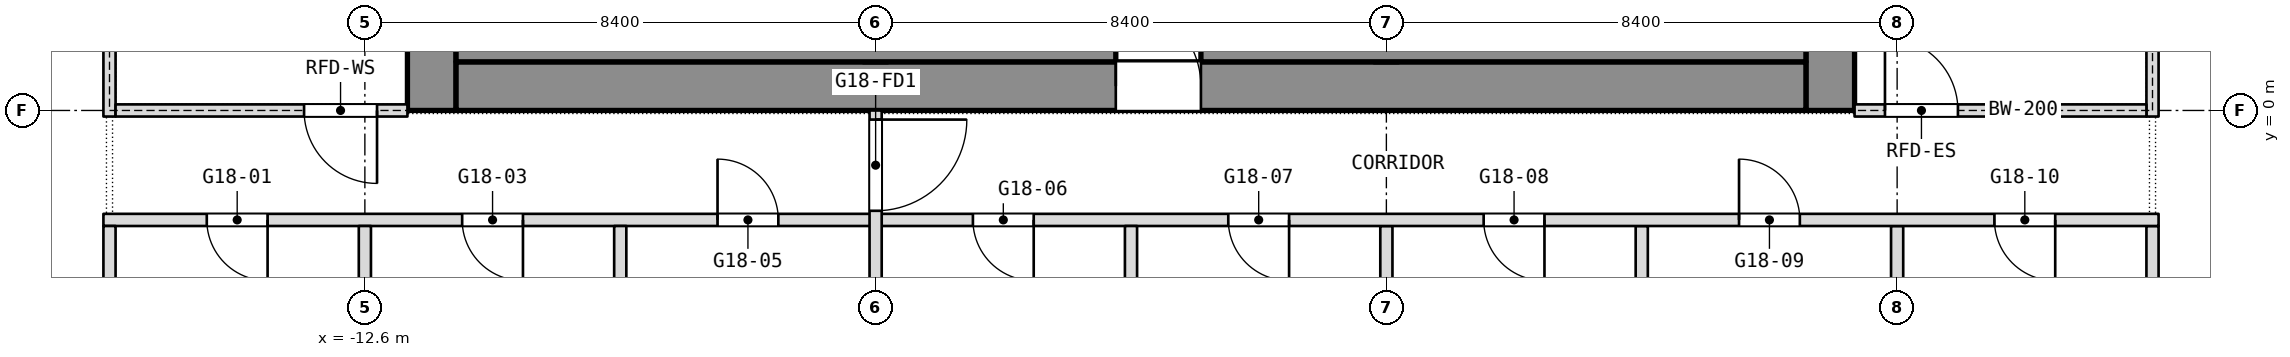
"""IFC4 building model, lengths in metres.
Left out: names, types, materials, properties, quantities, classifications, styles, units other than length and angle.
Written with IfcOpenShell. Run it as: python <this file> out.ifc"""

import sys

from ifc_helpers import new_model, si_unit, direction, frame, frame_2d, origin, place, context, subcontext, project, spatial, rectangle, extrude, element, fill, save


model = new_model("IFC4")
c1 = context("Model", 3, precision=1e-05, world=origin(), true_north=direction((0.0, 1.0)))
c2 = subcontext(c1, "Body", "Model", "MODEL_VIEW")
j1 = project(units=[si_unit("LENGTHUNIT", "METRE"), si_unit("PLANEANGLEUNIT", "RADIAN")], contexts=[c1])
p1 = place(None, origin())
s1 = spatial("IfcSite", under=j1, at=p1, CompositionType="ELEMENT")
p2 = place(p1, origin())
s2 = spatial("IfcBuilding", under=s1, at=p2, CompositionType="ELEMENT")
p3 = place(p2, frame((0.0, 0.0, 216.5)))
s3 = spatial("IfcBuildingStorey", under=s2, at=p3, CompositionType="ELEMENT", Elevation=216.5)
p4 = place(p3, frame((11.5, 0.0, 0.0), z_axis=(0.0, 0.0, 1.0), x_axis=(0.0, 1.0, 0.0)))
e1 = element("IfcWall", 1, at=p4, inside=s3, PredefinedType="SHEAR", context=c2, shape_type="SweptSolid", body=[
    extrude(rectangle(XDim=16.8, YDim=0.8, at=frame_2d((8.4, 0.0))), origin(), (0.0, 0.0, 1.0), 3.6),
])
p5 = place(p4, frame((2.3, 0.0, 0.0)))
e2 = element("IfcOpeningElement", 2, at=p5, cuts=e1, PredefinedType="OPENING", context=c2, shape_type="SweptSolid", body=[
    extrude(rectangle(XDim=1.1, YDim=2.1, at=frame_2d((0.55, 1.05))), frame((0.0, 0.4, 0.0), z_axis=(0.0, -1.0, 0.0), x_axis=(1.0, 0.0, 0.0)), (0.0, 0.0, 1.0), 0.8),
])
p6 = place(p4, frame((4.85, 0.0, 0.0)))
e3 = element("IfcOpeningElement", 3, at=p6, cuts=e1, PredefinedType="OPENING", context=c2, shape_type="SweptSolid", body=[
    extrude(rectangle(XDim=1.1, YDim=2.1, at=frame_2d((0.55, 1.05))), frame((0.0, 0.4, 0.0), z_axis=(0.0, -1.0, 0.0), x_axis=(1.0, 0.0, 0.0)), (0.0, 0.0, 1.0), 0.8),
])
p7 = place(p4, frame((6.825, 0.0, 0.0)))
e4 = element("IfcOpeningElement", 4, at=p7, cuts=e1, PredefinedType="OPENING", context=c2, shape_type="SweptSolid", body=[
    extrude(rectangle(XDim=1.2, YDim=2.1, at=frame_2d((0.6, 1.05))), frame((0.0, 0.4, 0.0), z_axis=(0.0, -1.0, 0.0), x_axis=(1.0, 0.0, 0.0)), (0.0, 0.0, 1.0), 0.8),
])
p8 = place(p4, frame((13.4, 0.0, 0.0)))
e5 = element("IfcOpeningElement", 5, at=p8, cuts=e1, PredefinedType="OPENING", context=c2, shape_type="SweptSolid", body=[
    extrude(rectangle(XDim=1.1, YDim=2.1, at=frame_2d((0.55, 1.05))), frame((0.0, 0.4, 0.0), z_axis=(0.0, -1.0, 0.0), x_axis=(1.0, 0.0, 0.0)), (0.0, 0.0, 1.0), 0.8),
])
p9 = place(p4, frame((10.85, 0.0, 0.0)))
e6 = element("IfcOpeningElement", 6, at=p9, cuts=e1, PredefinedType="OPENING", context=c2, shape_type="SweptSolid", body=[
    extrude(rectangle(XDim=1.1, YDim=2.1, at=frame_2d((0.55, 1.05))), frame((0.0, 0.4, 0.0), z_axis=(0.0, -1.0, 0.0), x_axis=(1.0, 0.0, 0.0)), (0.0, 0.0, 1.0), 0.8),
])
p10 = place(p4, frame((8.775, 0.0, 0.0)))
e7 = element("IfcOpeningElement", 7, at=p10, cuts=e1, PredefinedType="OPENING", context=c2, shape_type="SweptSolid", body=[
    extrude(rectangle(XDim=1.2, YDim=2.1, at=frame_2d((0.6, 1.05))), frame((0.0, 0.4, 0.0), z_axis=(0.0, -1.0, 0.0), x_axis=(1.0, 0.0, 0.0)), (0.0, 0.0, 1.0), 0.8),
])
p11 = place(p3, frame((-11.5, 0.0, 0.0), z_axis=(0.0, 0.0, 1.0), x_axis=(0.0, 1.0, 0.0)))
e8 = element("IfcWall", 8, at=p11, inside=s3, PredefinedType="SHEAR", context=c2, shape_type="SweptSolid", body=[
    extrude(rectangle(XDim=16.8, YDim=0.8, at=frame_2d((8.4, 0.0))), origin(), (0.0, 0.0, 1.0), 3.6),
])
p12 = place(p11, frame((3.6, 0.0, 0.0)))
e9 = element("IfcOpeningElement", 9, at=p12, cuts=e8, PredefinedType="OPENING", context=c2, shape_type="SweptSolid", body=[
    extrude(rectangle(XDim=0.9, YDim=2.1, at=frame_2d((0.45, 1.05))), frame((0.0, 0.4, 0.0), z_axis=(0.0, -1.0, 0.0), x_axis=(1.0, 0.0, 0.0)), (0.0, 0.0, 1.0), 0.8),
])
p13 = place(p11, frame((6.825, 0.0, 0.0)))
e10 = element("IfcOpeningElement", 10, at=p13, cuts=e8, PredefinedType="OPENING", context=c2, shape_type="SweptSolid", body=[
    extrude(rectangle(XDim=1.2, YDim=2.1, at=frame_2d((0.6, 1.05))), frame((0.0, 0.4, 0.0), z_axis=(0.0, -1.0, 0.0), x_axis=(1.0, 0.0, 0.0)), (0.0, 0.0, 1.0), 0.8),
])
p14 = place(p11, frame((12.3, 0.0, 0.0)))
e11 = element("IfcOpeningElement", 11, at=p14, cuts=e8, PredefinedType="OPENING", context=c2, shape_type="SweptSolid", body=[
    extrude(rectangle(XDim=0.9, YDim=2.1, at=frame_2d((0.45, 1.05))), frame((0.0, 0.4, 0.0), z_axis=(0.0, -1.0, 0.0), x_axis=(1.0, 0.0, 0.0)), (0.0, 0.0, 1.0), 0.8),
])
p15 = place(p11, frame((8.775, 0.0, 0.0)))
e12 = element("IfcOpeningElement", 12, at=p15, cuts=e8, PredefinedType="OPENING", context=c2, shape_type="SweptSolid", body=[
    extrude(rectangle(XDim=1.2, YDim=2.1, at=frame_2d((0.6, 1.05))), frame((0.0, 0.4, 0.0), z_axis=(0.0, -1.0, 0.0), x_axis=(1.0, 0.0, 0.0)), (0.0, 0.0, 1.0), 0.8),
])
p16 = place(p3, frame((-11.1, 0.4, 0.0), z_axis=(0.0, 0.0, 1.0), x_axis=(1.0, 0.0, 0.0)))
e13 = element("IfcWall", 13, at=p16, inside=s3, PredefinedType="SHEAR", context=c2, shape_type="SweptSolid", body=[
    extrude(rectangle(XDim=22.2, YDim=0.8, at=frame_2d((11.1, 0.0))), origin(), (0.0, 0.0, 1.0), 3.6),
])
p17 = place(p16, frame((10.85, 0.0, 0.0)))
e14 = element("IfcOpeningElement", 14, at=p17, cuts=e13, PredefinedType="OPENING", context=c2, shape_type="SweptSolid", body=[
    extrude(rectangle(XDim=1.4, YDim=2.1, at=frame_2d((0.7, 1.05))), frame((0.0, 0.4, 0.0), z_axis=(0.0, -1.0, 0.0), x_axis=(1.0, 0.0, 0.0)), (0.0, 0.0, 1.0), 0.8),
])
p18 = place(p3, frame((-4.2, 0.8, 0.0), z_axis=(0.0, 0.0, 1.0), x_axis=(0.0, 1.0, 0.0)))
e15 = element("IfcWall", 15, at=p18, inside=s3, PredefinedType="SHEAR", context=c2, shape_type="SweptSolid", body=[
    extrude(rectangle(XDim=15.2, YDim=0.4, at=frame_2d((7.6, 0.0))), origin(), (0.0, 0.0, 1.0), 3.6),
])
p19 = place(p18, frame((8.5, 0.0, 0.0)))
e16 = element("IfcOpeningElement", 16, at=p19, cuts=e15, PredefinedType="OPENING", context=c2, shape_type="SweptSolid", body=[
    extrude(rectangle(XDim=1.2, YDim=2.1, at=frame_2d((0.6, 1.05))), frame((0.0, 0.2, 0.0), z_axis=(0.0, -1.0, 0.0), x_axis=(1.0, 0.0, 0.0)), (0.0, 0.0, 1.0), 0.4),
])
p20 = place(p3, frame((4.2, 0.8, 0.0), z_axis=(0.0, 0.0, 1.0), x_axis=(0.0, 1.0, 0.0)))
e17 = element("IfcWall", 17, at=p20, inside=s3, PredefinedType="SHEAR", context=c2, shape_type="SweptSolid", body=[
    extrude(rectangle(XDim=15.2, YDim=0.4, at=frame_2d((7.6, 0.0))), origin(), (0.0, 0.0, 1.0), 3.6),
])
p21 = place(p20, frame((5.95, 0.0, 0.0)))
e18 = element("IfcOpeningElement", 18, at=p21, cuts=e17, PredefinedType="OPENING", context=c2, shape_type="SweptSolid", body=[
    extrude(rectangle(XDim=1.2, YDim=2.1, at=frame_2d((0.6, 1.05))), frame((0.0, 0.2, 0.0), z_axis=(0.0, -1.0, 0.0), x_axis=(1.0, 0.0, 0.0)), (0.0, 0.0, 1.0), 0.4),
])
for number, where, z_axis, x_axis in (
    (19, (16.8, -7.8, 0.0), (0.0, 0.0, 1.0), (0.0, 1.0, 0.0)),
    (20, (12.6, -7.8, 0.0), (0.0, 0.0, 1.0), (0.0, 1.0, 0.0)),
):
    element("IfcWall", number, at=place(p3, frame(where, z_axis=z_axis, x_axis=x_axis)), inside=s3, PredefinedType="PARTITIONING", context=c2, shape_type="SweptSolid", body=[
        extrude(rectangle(XDim=5.9, YDim=0.2, at=frame_2d((2.95, 0.0))), origin(), (0.0, 0.0, 1.0), 3.34),
    ])
p22 = place(p3, frame((8.4, -8.0, 0.0), z_axis=(0.0, 0.0, 1.0), x_axis=(0.0, 1.0, 0.0)))
e21 = element("IfcWall", 21, at=p22, inside=s3, PredefinedType="PARTITIONING", context=c2, shape_type="SweptSolid", body=[
    extrude(rectangle(XDim=6.1, YDim=0.2, at=frame_2d((3.05, 0.0))), origin(), (0.0, 0.0, 1.0), 3.34),
])
p23 = place(p3, frame((4.2, -11.6, 0.0), z_axis=(0.0, 0.0, 1.0), x_axis=(0.0, 1.0, 0.0)))
e22 = element("IfcWall", 22, at=p23, inside=s3, PredefinedType="PARTITIONING", context=c2, shape_type="SweptSolid", body=[
    extrude(rectangle(XDim=9.7, YDim=0.2, at=frame_2d((4.85, 0.0))), origin(), (0.0, 0.0, 1.0), 3.34),
])
p24 = place(p3, frame((-16.9, -1.8, 0.0), z_axis=(0.0, 0.0, 1.0), x_axis=(1.0, 0.0, 0.0)))
e23 = element("IfcWall", 23, at=p24, inside=s3, PredefinedType="PARTITIONING", context=c2, shape_type="SweptSolid", body=[
    extrude(rectangle(XDim=33.8, YDim=0.2, at=frame_2d((16.9, 0.0))), origin(), (0.0, 0.0, 1.0), 3.34),
])
p25 = place(p24, frame((1.7, 0.0, 0.0)))
e24 = element("IfcOpeningElement", 24, at=p25, cuts=e23, PredefinedType="OPENING", context=c2, shape_type="SweptSolid", body=[
    extrude(rectangle(XDim=1.0, YDim=2.1, at=frame_2d((0.5, 1.05))), frame((0.0, 0.1, 0.0), z_axis=(0.0, -1.0, 0.0), x_axis=(1.0, 0.0, 0.0)), (0.0, 0.0, 1.0), 0.2),
])
p26 = place(p24, frame((5.9, 0.0, 0.0)))
e25 = element("IfcOpeningElement", 25, at=p26, cuts=e23, PredefinedType="OPENING", context=c2, shape_type="SweptSolid", body=[
    extrude(rectangle(XDim=1.0, YDim=2.1, at=frame_2d((0.5, 1.05))), frame((0.0, 0.1, 0.0), z_axis=(0.0, -1.0, 0.0), x_axis=(1.0, 0.0, 0.0)), (0.0, 0.0, 1.0), 0.2),
])
p27 = place(p24, frame((10.1, 0.0, 0.0)))
e26 = element("IfcOpeningElement", 26, at=p27, cuts=e23, PredefinedType="OPENING", context=c2, shape_type="SweptSolid", body=[
    extrude(rectangle(XDim=1.0, YDim=2.1, at=frame_2d((0.5, 1.05))), frame((0.0, 0.1, 0.0), z_axis=(0.0, -1.0, 0.0), x_axis=(1.0, 0.0, 0.0)), (0.0, 0.0, 1.0), 0.2),
])
p28 = place(p24, frame((14.3, 0.0, 0.0)))
e27 = element("IfcOpeningElement", 27, at=p28, cuts=e23, PredefinedType="OPENING", context=c2, shape_type="SweptSolid", body=[
    extrude(rectangle(XDim=1.0, YDim=2.1, at=frame_2d((0.5, 1.05))), frame((0.0, 0.1, 0.0), z_axis=(0.0, -1.0, 0.0), x_axis=(1.0, 0.0, 0.0)), (0.0, 0.0, 1.0), 0.2),
])
p29 = place(p24, frame((18.5, 0.0, 0.0)))
e28 = element("IfcOpeningElement", 28, at=p29, cuts=e23, PredefinedType="OPENING", context=c2, shape_type="SweptSolid", body=[
    extrude(rectangle(XDim=1.0, YDim=2.1, at=frame_2d((0.5, 1.05))), frame((0.0, 0.1, 0.0), z_axis=(0.0, -1.0, 0.0), x_axis=(1.0, 0.0, 0.0)), (0.0, 0.0, 1.0), 0.2),
])
p30 = place(p24, frame((22.7, 0.0, 0.0)))
e29 = element("IfcOpeningElement", 29, at=p30, cuts=e23, PredefinedType="OPENING", context=c2, shape_type="SweptSolid", body=[
    extrude(rectangle(XDim=1.0, YDim=2.1, at=frame_2d((0.5, 1.05))), frame((0.0, 0.1, 0.0), z_axis=(0.0, -1.0, 0.0), x_axis=(1.0, 0.0, 0.0)), (0.0, 0.0, 1.0), 0.2),
])
p31 = place(p24, frame((26.9, 0.0, 0.0)))
e30 = element("IfcOpeningElement", 30, at=p31, cuts=e23, PredefinedType="OPENING", context=c2, shape_type="SweptSolid", body=[
    extrude(rectangle(XDim=1.0, YDim=2.1, at=frame_2d((0.5, 1.05))), frame((0.0, 0.1, 0.0), z_axis=(0.0, -1.0, 0.0), x_axis=(1.0, 0.0, 0.0)), (0.0, 0.0, 1.0), 0.2),
])
p32 = place(p24, frame((31.1, 0.0, 0.0)))
e31 = element("IfcOpeningElement", 31, at=p32, cuts=e23, PredefinedType="OPENING", context=c2, shape_type="SweptSolid", body=[
    extrude(rectangle(XDim=1.0, YDim=2.1, at=frame_2d((0.5, 1.05))), frame((0.0, 0.1, 0.0), z_axis=(0.0, -1.0, 0.0), x_axis=(1.0, 0.0, 0.0)), (0.0, 0.0, 1.0), 0.2),
])
p33 = place(p3, frame((0.0, -11.6, 0.0), z_axis=(0.0, 0.0, 1.0), x_axis=(0.0, 1.0, 0.0)))
e32 = element("IfcWall", 32, at=p33, inside=s3, PredefinedType="PARTITIONING", context=c2, shape_type="SweptSolid", body=[
    extrude(rectangle(XDim=9.7, YDim=0.2, at=frame_2d((4.85, 0.0))), origin(), (0.0, 0.0, 1.0), 3.34),
])
p34 = place(p3, frame((-4.2, -13.6, 0.0), z_axis=(0.0, 0.0, 1.0), x_axis=(0.0, 1.0, 0.0)))
e33 = element("IfcWall", 33, at=p34, inside=s3, PredefinedType="PARTITIONING", context=c2, shape_type="SweptSolid", body=[
    extrude(rectangle(XDim=13.6, YDim=0.2, at=frame_2d((6.8, 0.0))), origin(), (0.0, 0.0, 1.0), 3.34),
])
p35 = place(p34, frame((11.95, 0.0, 0.0)))
e34 = element("IfcOpeningElement", 34, at=p35, cuts=e33, PredefinedType="OPENING", context=c2, shape_type="SweptSolid", body=[
    extrude(rectangle(XDim=1.5, YDim=2.1, at=frame_2d((0.75, 1.05))), frame((0.0, 0.1, 0.0), z_axis=(0.0, -1.0, 0.0), x_axis=(1.0, 0.0, 0.0)), (0.0, 0.0, 1.0), 0.2),
])
p36 = place(p34, frame((0.25, 0.0, 0.0)))
e35 = element("IfcOpeningElement", 35, at=p36, cuts=e33, PredefinedType="OPENING", context=c2, shape_type="SweptSolid", body=[
    extrude(rectangle(XDim=1.5, YDim=2.1, at=frame_2d((0.75, 1.05))), frame((0.0, 0.1, 0.0), z_axis=(0.0, -1.0, 0.0), x_axis=(1.0, 0.0, 0.0)), (0.0, 0.0, 1.0), 0.2),
])
p37 = place(p3, frame((-8.4, -8.0, 0.0), z_axis=(0.0, 0.0, 1.0), x_axis=(0.0, 1.0, 0.0)))
e36 = element("IfcWall", 36, at=p37, inside=s3, PredefinedType="PARTITIONING", context=c2, shape_type="SweptSolid", body=[
    extrude(rectangle(XDim=6.1, YDim=0.2, at=frame_2d((3.05, 0.0))), origin(), (0.0, 0.0, 1.0), 3.34),
])
p38 = place(p3, frame((-12.6, -7.8, 0.0), z_axis=(0.0, 0.0, 1.0), x_axis=(0.0, 1.0, 0.0)))
e37 = element("IfcWall", 37, at=p38, inside=s3, PredefinedType="PARTITIONING", context=c2, shape_type="SweptSolid", body=[
    extrude(rectangle(XDim=5.9, YDim=0.2, at=frame_2d((2.95, 0.0))), origin(), (0.0, 0.0, 1.0), 3.34),
])
p39 = place(p3, frame((-16.8, -8.0, 0.0), z_axis=(0.0, 0.0, 1.0), x_axis=(0.0, 1.0, 0.0)))
e38 = element("IfcWall", 38, at=p39, inside=s3, PredefinedType="PARTITIONING", context=c2, shape_type="SweptSolid", body=[
    extrude(rectangle(XDim=6.1, YDim=0.2, at=frame_2d((3.05, 0.0))), origin(), (0.0, 0.0, 1.0), 3.34),
])
p40 = place(p3, frame((-11.1, 1.15, 0.0), z_axis=(0.0, 0.0, 1.0), x_axis=(1.0, 0.0, 0.0)))
e39 = element("IfcWall", 39, at=p40, inside=s3, PredefinedType="PARTITIONING", context=c2, shape_type="SweptSolid", body=[
    extrude(rectangle(XDim=10.85, YDim=0.7, at=frame_2d((5.425, 0.0))), origin(), (0.0, 0.0, 1.0), 3.34),
])
p41 = place(p3, frame((1.15, 1.15, 0.0), z_axis=(0.0, 0.0, 1.0), x_axis=(1.0, 0.0, 0.0)))
e40 = element("IfcWall", 40, at=p41, inside=s3, PredefinedType="PARTITIONING", context=c2, shape_type="SweptSolid", body=[
    extrude(rectangle(XDim=9.95, YDim=0.7, at=frame_2d((4.975, 0.0))), origin(), (0.0, 0.0, 1.0), 3.34),
])
p42 = place(p3, frame((-16.8, -0.1, 0.0), z_axis=(0.0, 0.0, 1.0), x_axis=(0.0, 1.0, 0.0)))
e41 = element("IfcWall", 41, at=p42, inside=s3, PredefinedType="PARTITIONING", context=c2, shape_type="SweptSolid", body=[
    extrude(rectangle(XDim=17.0, YDim=0.2, at=frame_2d((8.5, 0.0))), origin(), (0.0, 0.0, 1.0), 3.34),
])
p43 = place(p42, frame((2.2, 0.0, 0.0)))
e42 = element("IfcOpeningElement", 42, at=p43, cuts=e41, PredefinedType="OPENING", context=c2, shape_type="SweptSolid", body=[
    extrude(rectangle(XDim=1.8, YDim=2.1, at=frame_2d((0.9, 1.05))), frame((0.0, 0.1, 0.0), z_axis=(0.0, -1.0, 0.0), x_axis=(1.0, 0.0, 0.0)), (0.0, 0.0, 1.0), 0.2),
])
p44 = place(p42, frame((13.0, 0.0, 0.0)))
e43 = element("IfcOpeningElement", 43, at=p44, cuts=e41, PredefinedType="OPENING", context=c2, shape_type="SweptSolid", body=[
    extrude(rectangle(XDim=1.8, YDim=2.1, at=frame_2d((0.9, 1.05))), frame((0.0, 0.1, 0.0), z_axis=(0.0, -1.0, 0.0), x_axis=(1.0, 0.0, 0.0)), (0.0, 0.0, 1.0), 0.2),
])
p45 = place(p3, frame((-16.7, 0.0, 0.0), z_axis=(0.0, 0.0, 1.0), x_axis=(1.0, 0.0, 0.0)))
e44 = element("IfcWall", 44, at=p45, inside=s3, PredefinedType="PARTITIONING", context=c2, shape_type="SweptSolid", body=[
    extrude(rectangle(XDim=4.8, YDim=0.2, at=frame_2d((2.4, 0.0))), origin(), (0.0, 0.0, 1.0), 2.94),
])
p46 = place(p45, frame((3.1, 0.0, 0.0)))
e45 = element("IfcOpeningElement", 45, at=p46, cuts=e44, PredefinedType="OPENING", context=c2, shape_type="SweptSolid", body=[
    extrude(rectangle(XDim=1.2, YDim=2.1, at=frame_2d((0.6, 1.05))), frame((0.0, 0.1, 0.0), z_axis=(0.0, -1.0, 0.0), x_axis=(1.0, 0.0, 0.0)), (0.0, 0.0, 1.0), 0.2),
])
p47 = place(p3, frame((16.8, -0.1, 0.0), z_axis=(0.0, 0.0, 1.0), x_axis=(0.0, 1.0, 0.0)))
e46 = element("IfcWall", 46, at=p47, inside=s3, PredefinedType="PARTITIONING", context=c2, shape_type="SweptSolid", body=[
    extrude(rectangle(XDim=17.0, YDim=0.2, at=frame_2d((8.5, 0.0))), origin(), (0.0, 0.0, 1.0), 3.34),
])
p48 = place(p47, frame((2.2, 0.0, 0.0)))
e47 = element("IfcOpeningElement", 47, at=p48, cuts=e46, PredefinedType="OPENING", context=c2, shape_type="SweptSolid", body=[
    extrude(rectangle(XDim=1.8, YDim=2.1, at=frame_2d((0.9, 1.05))), frame((0.0, 0.1, 0.0), z_axis=(0.0, -1.0, 0.0), x_axis=(1.0, 0.0, 0.0)), (0.0, 0.0, 1.0), 0.2),
])
p49 = place(p47, frame((13.0, 0.0, 0.0)))
e48 = element("IfcOpeningElement", 48, at=p49, cuts=e46, PredefinedType="OPENING", context=c2, shape_type="SweptSolid", body=[
    extrude(rectangle(XDim=1.8, YDim=2.1, at=frame_2d((0.9, 1.05))), frame((0.0, 0.1, 0.0), z_axis=(0.0, -1.0, 0.0), x_axis=(1.0, 0.0, 0.0)), (0.0, 0.0, 1.0), 0.2),
])
p50 = place(p3, frame((11.9, 0.0, 0.0), z_axis=(0.0, 0.0, 1.0), x_axis=(1.0, 0.0, 0.0)))
e49 = element("IfcWall", 49, at=p50, inside=s3, PredefinedType="PARTITIONING", context=c2, shape_type="SweptSolid", body=[
    extrude(rectangle(XDim=4.8, YDim=0.2, at=frame_2d((2.4, 0.0))), origin(), (0.0, 0.0, 1.0), 2.94),
])
p51 = place(p50, frame((0.5, 0.0, 0.0)))
e50 = element("IfcOpeningElement", 50, at=p51, cuts=e49, PredefinedType="OPENING", context=c2, shape_type="SweptSolid", body=[
    extrude(rectangle(XDim=1.2, YDim=2.1, at=frame_2d((0.6, 1.05))), frame((0.0, 0.1, 0.0), z_axis=(0.0, -1.0, 0.0), x_axis=(1.0, 0.0, 0.0)), (0.0, 0.0, 1.0), 0.2),
])
p52 = place(p25, origin())
e51 = element("IfcDoor", 51, at=p52, inside=s3, OperationType="SINGLE_SWING_LEFT", PredefinedType="DOOR", context=c2, shape_type="SweptSolid", body=[
    extrude(rectangle(XDim=1.0, YDim=2.1, at=frame_2d((0.5, 1.05))), frame((0.0, 0.025, 0.0), z_axis=(0.0, -1.0, 0.0), x_axis=(1.0, 0.0, 0.0)), (0.0, 0.0, 1.0), 0.05),
])
fill(e24, e51)
p53 = place(p26, origin())
e52 = element("IfcDoor", 52, at=p53, inside=s3, OperationType="SINGLE_SWING_LEFT", PredefinedType="DOOR", context=c2, shape_type="SweptSolid", body=[
    extrude(rectangle(XDim=1.0, YDim=2.1, at=frame_2d((0.5, 1.05))), frame((0.0, 0.025, 0.0), z_axis=(0.0, -1.0, 0.0), x_axis=(1.0, 0.0, 0.0)), (0.0, 0.0, 1.0), 0.05),
])
fill(e25, e52)
p54 = place(p27, origin())
e53 = element("IfcDoor", 53, at=p54, inside=s3, OperationType="SINGLE_SWING_RIGHT", PredefinedType="DOOR", context=c2, shape_type="SweptSolid", body=[
    extrude(rectangle(XDim=1.0, YDim=2.1, at=frame_2d((0.5, 1.05))), frame((0.0, 0.025, 0.0), z_axis=(0.0, -1.0, 0.0), x_axis=(1.0, 0.0, 0.0)), (0.0, 0.0, 1.0), 0.05),
])
fill(e26, e53)
p55 = place(p28, origin())
e54 = element("IfcDoor", 54, at=p55, inside=s3, OperationType="SINGLE_SWING_LEFT", PredefinedType="DOOR", context=c2, shape_type="SweptSolid", body=[
    extrude(rectangle(XDim=1.0, YDim=2.1, at=frame_2d((0.5, 1.05))), frame((0.0, 0.025, 0.0), z_axis=(0.0, -1.0, 0.0), x_axis=(1.0, 0.0, 0.0)), (0.0, 0.0, 1.0), 0.05),
])
fill(e27, e54)
p56 = place(p29, origin())
e55 = element("IfcDoor", 55, at=p56, inside=s3, OperationType="SINGLE_SWING_RIGHT", PredefinedType="DOOR", context=c2, shape_type="SweptSolid", body=[
    extrude(rectangle(XDim=1.0, YDim=2.1, at=frame_2d((0.5, 1.05))), frame((0.0, 0.025, 0.0), z_axis=(0.0, -1.0, 0.0), x_axis=(1.0, 0.0, 0.0)), (0.0, 0.0, 1.0), 0.05),
])
fill(e28, e55)
p57 = place(p30, origin())
e56 = element("IfcDoor", 56, at=p57, inside=s3, OperationType="SINGLE_SWING_LEFT", PredefinedType="DOOR", context=c2, shape_type="SweptSolid", body=[
    extrude(rectangle(XDim=1.0, YDim=2.1, at=frame_2d((0.5, 1.05))), frame((0.0, 0.025, 0.0), z_axis=(0.0, -1.0, 0.0), x_axis=(1.0, 0.0, 0.0)), (0.0, 0.0, 1.0), 0.05),
])
fill(e29, e56)
p58 = place(p31, origin())
e57 = element("IfcDoor", 57, at=p58, inside=s3, OperationType="SINGLE_SWING_RIGHT", PredefinedType="DOOR", context=c2, shape_type="SweptSolid", body=[
    extrude(rectangle(XDim=1.0, YDim=2.1, at=frame_2d((0.5, 1.05))), frame((0.0, 0.025, 0.0), z_axis=(0.0, -1.0, 0.0), x_axis=(1.0, 0.0, 0.0)), (0.0, 0.0, 1.0), 0.05),
])
fill(e30, e57)
p59 = place(p32, origin())
e58 = element("IfcDoor", 58, at=p59, inside=s3, OperationType="SINGLE_SWING_LEFT", PredefinedType="DOOR", context=c2, shape_type="SweptSolid", body=[
    extrude(rectangle(XDim=1.0, YDim=2.1, at=frame_2d((0.5, 1.05))), frame((0.0, 0.025, 0.0), z_axis=(0.0, -1.0, 0.0), x_axis=(1.0, 0.0, 0.0)), (0.0, 0.0, 1.0), 0.05),
])
fill(e31, e58)
p60 = place(p17, origin())
e59 = element("IfcDoor", 59, at=p60, inside=s3, OperationType="SINGLE_SWING_LEFT", PredefinedType="DOOR", context=c2, shape_type="SweptSolid", body=[
    extrude(rectangle(XDim=1.4, YDim=2.1, at=frame_2d((0.7, 1.05))), frame((0.0, 0.025, 0.0), z_axis=(0.0, -1.0, 0.0), x_axis=(1.0, 0.0, 0.0)), (0.0, 0.0, 1.0), 0.05),
])
fill(e14, e59)
p61 = place(p46, origin())
e60 = element("IfcDoor", 60, at=p61, inside=s3, OperationType="SINGLE_SWING_LEFT", PredefinedType="DOOR", context=c2, shape_type="SweptSolid", body=[
    extrude(rectangle(XDim=1.2, YDim=2.1, at=frame_2d((0.6, 1.05))), frame((0.0, 0.025, 0.0), z_axis=(0.0, -1.0, 0.0), x_axis=(1.0, 0.0, 0.0)), (0.0, 0.0, 1.0), 0.05),
])
fill(e45, e60)
p62 = place(p51, origin())
e61 = element("IfcDoor", 61, at=p62, inside=s3, OperationType="SINGLE_SWING_LEFT", PredefinedType="DOOR", context=c2, shape_type="SweptSolid", body=[
    extrude(rectangle(XDim=1.2, YDim=2.1, at=frame_2d((0.6, 1.05))), frame((0.0, 0.025, 0.0), z_axis=(0.0, -1.0, 0.0), x_axis=(1.0, 0.0, 0.0)), (0.0, 0.0, 1.0), 0.05),
])
fill(e50, e61)
p63 = place(p35, origin())
e62 = element("IfcDoor", 62, at=p63, inside=s3, OperationType="DOUBLE_DOOR_DOUBLE_SWING", PredefinedType="DOOR", context=c2, shape_type="SweptSolid", body=[
    extrude(rectangle(XDim=1.5, YDim=2.1, at=frame_2d((0.75, 1.05))), frame((0.0, 0.025, 0.0), z_axis=(0.0, -1.0, 0.0), x_axis=(1.0, 0.0, 0.0)), (0.0, 0.0, 1.0), 0.05),
])
fill(e34, e62)
save(model, sys.argv[1])
